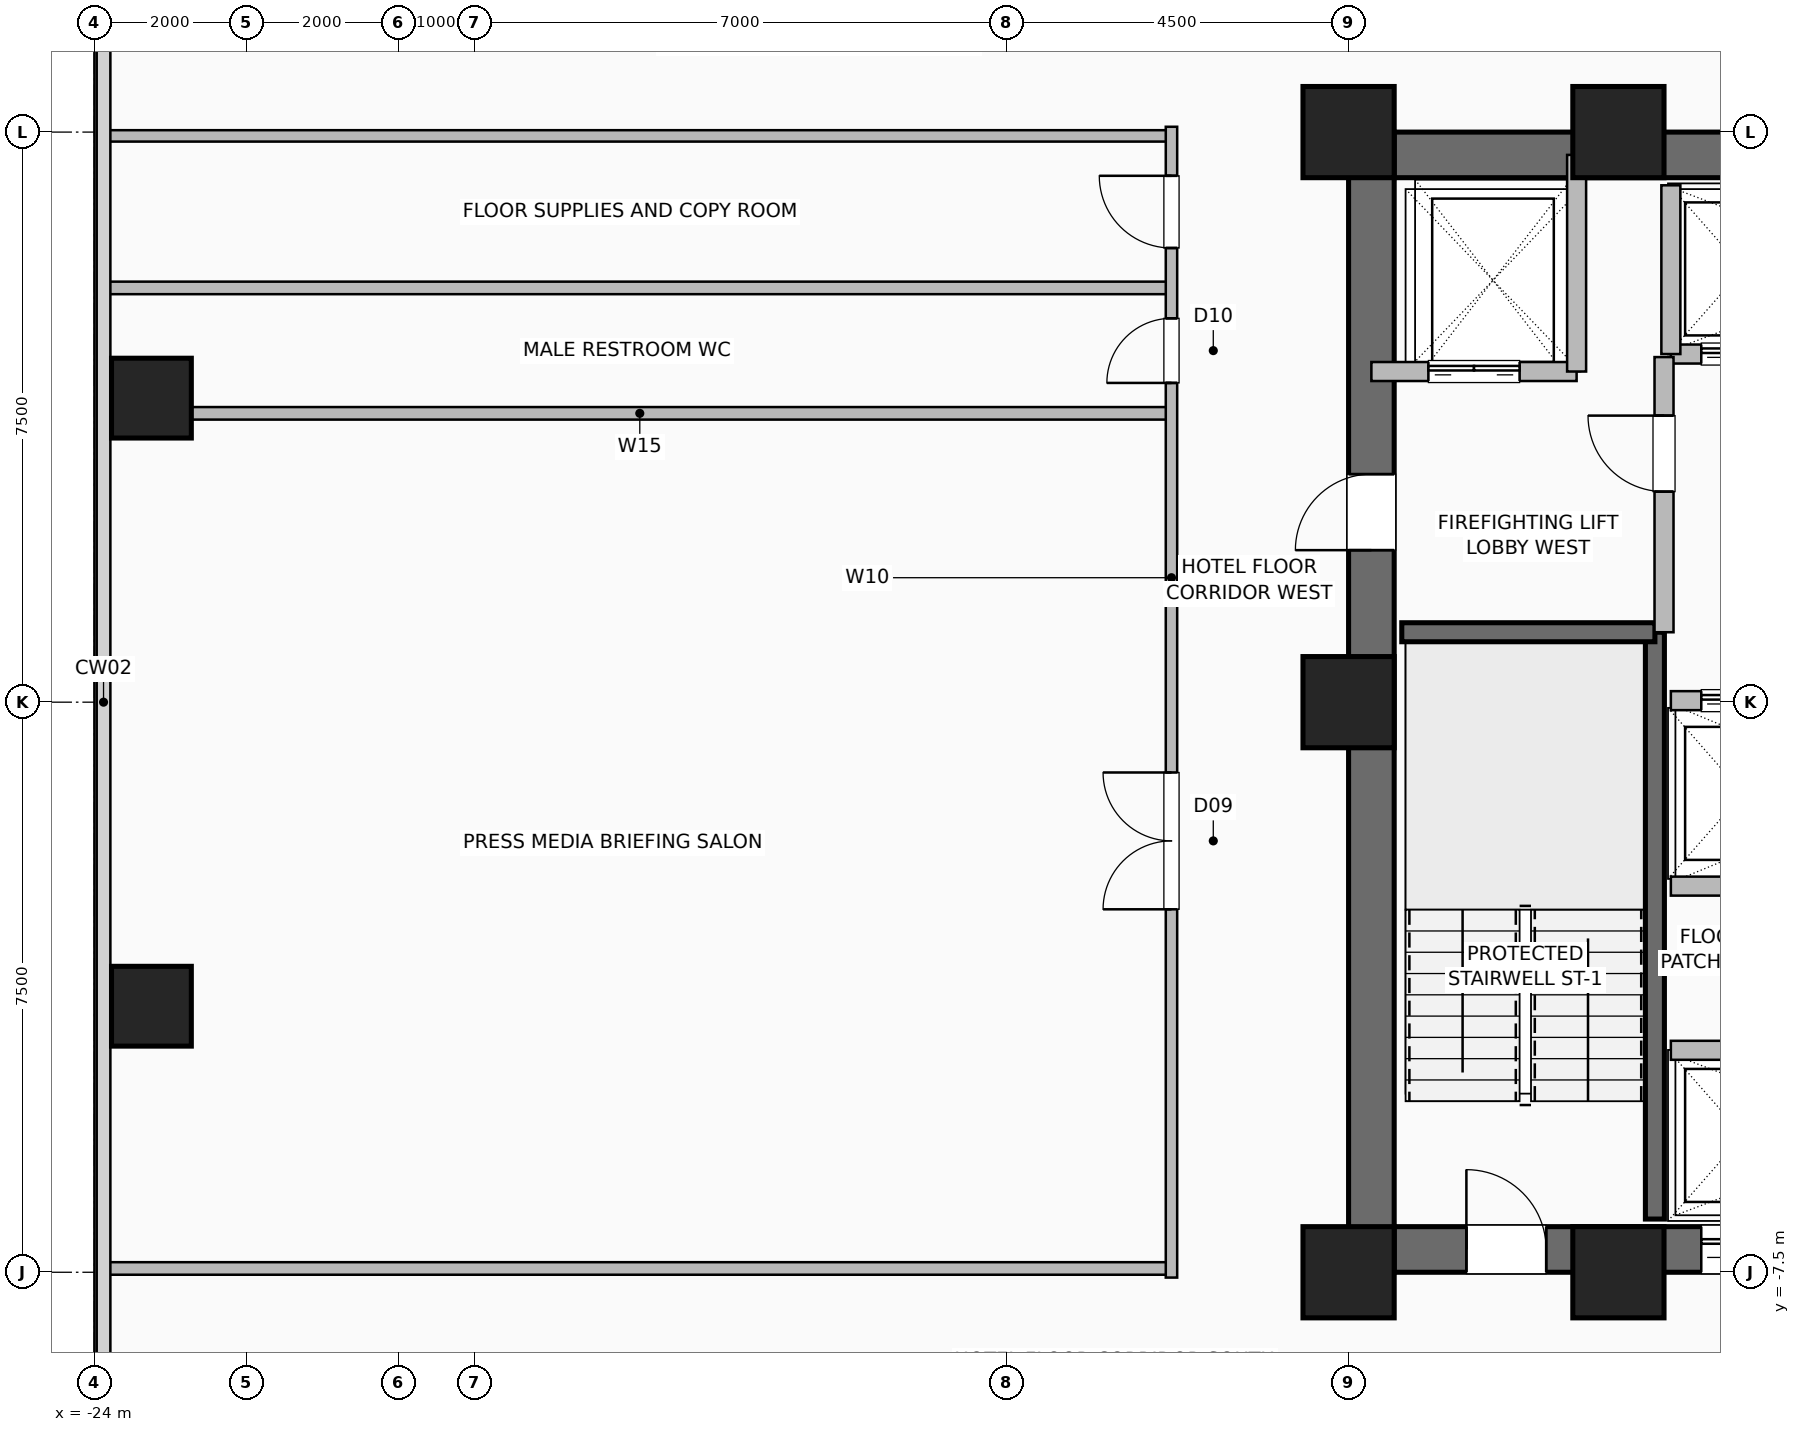
"""IFC4 building model, lengths in metres.
Left out: names, types, materials, properties, quantities, classifications, styles, units other than length and angle.
Written with IfcOpenShell. Run it as: python <this file> out.ifc"""

import sys

from ifc_helpers import new_model, si_unit, direction, frame, frame_2d, origin, origin_2d, place, context, subcontext, project, spatial, rectangle, hollow_rectangle, extrude, element, fill, save


model = new_model("IFC4")
c1 = context("Model", 3, precision=1e-05, world=origin(), true_north=direction((0.0, 1.0)))
c2 = subcontext(c1, "Body", "Model", "MODEL_VIEW")
j1 = project(units=[si_unit("LENGTHUNIT", "METRE"), si_unit("PLANEANGLEUNIT", "RADIAN")], contexts=[c1])
p1 = place(None, origin())
s1 = spatial("IfcSite", under=j1, at=p1, CompositionType="ELEMENT")
p2 = place(p1, origin())
s2 = spatial("IfcBuilding", under=s1, at=p2, CompositionType="ELEMENT")
p3 = place(p2, frame((0.0, 0.0, 44.5)))
s3 = spatial("IfcBuildingStorey", under=s2, at=p3, CompositionType="ELEMENT", Elevation=44.5)
for number, where, z_axis, x_axis in (
    (1, (-7.5, -7.5, 0.0), (0.0, 0.0, 1.0), (1.0, 0.0, 0.0)),
    (2, (-3.95, -7.5, 0.0), (0.0, 0.0, 1.0), (1.0, 0.0, 0.0)),
    (3, (-3.95, 7.5, 0.0), (0.0, 0.0, 1.0), (1.0, 0.0, 0.0)),
    (4, (-7.5, 7.5, 0.0), (0.0, 0.0, 1.0), (1.0, 0.0, 0.0)),
    (5, (-7.5, 0.0, 0.0), (0.0, 0.0, 1.0), (1.0, 0.0, 0.0)),
):
    element("IfcColumn", number, at=place(p3, frame(where, z_axis=z_axis, x_axis=x_axis)), inside=s3, PredefinedType="COLUMN", context=c2, shape_type="SweptSolid", body=[
        extrude(hollow_rectangle(XDim=1.2, YDim=1.2, WallThickness=0.055, at=origin_2d()), origin(), (0.0, 0.0, 1.0), 3.5),
    ])
for number, where, z_axis, x_axis in (
    (6, (-23.25, -4.0, 0.0), (0.0, 0.0, 1.0), (1.0, 0.0, 0.0)),
    (7, (-23.25, 4.0, 0.0), (0.0, 0.0, 1.0), (1.0, 0.0, 0.0)),
):
    element("IfcColumn", number, at=place(p3, frame(where, z_axis=z_axis, x_axis=x_axis)), inside=s3, PredefinedType="COLUMN", context=c2, shape_type="SweptSolid", body=[
        extrude(hollow_rectangle(XDim=1.05, YDim=1.05, WallThickness=0.05, at=origin_2d()), origin(), (0.0, 0.0, 1.0), 3.5),
    ])
p4 = place(p3, frame((-7.5, -7.2, 0.0), z_axis=(0.0, 0.0, 1.0), x_axis=(1.0, 0.0, 0.0)))
e8 = element("IfcWall", 8, at=p4, inside=s3, PredefinedType="SHEAR", context=c2, shape_type="SweptSolid", body=[
    extrude(rectangle(XDim=15.0, YDim=0.6, at=frame_2d((7.5, 0.0))), origin(), (0.0, 0.0, 1.0), 3.25),
])
p5 = place(p4, frame((1.55, 0.0, 0.0)))
e9 = element("IfcOpeningElement", 9, at=p5, cuts=e8, PredefinedType="OPENING", context=c2, shape_type="SweptSolid", body=[
    extrude(rectangle(XDim=1.05, YDim=2.08, at=frame_2d((0.525, 1.04))), frame((0.0, 0.31, 0.0), z_axis=(0.0, -1.0, 0.0), x_axis=(1.0, 0.0, 0.0)), (0.0, 0.0, 1.0), 0.62),
])
p6 = place(p4, frame((12.4, 0.0, 0.0)))
e10 = element("IfcOpeningElement", 10, at=p6, cuts=e8, PredefinedType="OPENING", context=c2, shape_type="SweptSolid", body=[
    extrude(rectangle(XDim=1.05, YDim=2.08, at=frame_2d((0.525, 1.04))), frame((0.0, 0.31, 0.0), z_axis=(0.0, -1.0, 0.0), x_axis=(1.0, 0.0, 0.0)), (0.0, 0.0, 1.0), 0.62),
])
p7 = place(p4, frame((4.64, 0.0, 0.0)))
e11 = element("IfcOpeningElement", 11, at=p7, cuts=e8, PredefinedType="OPENING", context=c2, shape_type="SweptSolid", body=[
    extrude(rectangle(XDim=1.1, YDim=2.2, at=frame_2d((0.55, 1.1))), frame((0.0, 0.31, 0.0), z_axis=(0.0, -1.0, 0.0), x_axis=(1.0, 0.0, 0.0)), (0.0, 0.0, 1.0), 0.62),
])
p8 = place(p4, frame((6.52, 0.0, 0.0)))
e12 = element("IfcOpeningElement", 12, at=p8, cuts=e8, PredefinedType="OPENING", context=c2, shape_type="SweptSolid", body=[
    extrude(rectangle(XDim=1.1, YDim=2.2, at=frame_2d((0.55, 1.1))), frame((0.0, 0.31, 0.0), z_axis=(0.0, -1.0, 0.0), x_axis=(1.0, 0.0, 0.0)), (0.0, 0.0, 1.0), 0.62),
])
p9 = place(p4, frame((8.4, 0.0, 0.0)))
e13 = element("IfcOpeningElement", 13, at=p9, cuts=e8, PredefinedType="OPENING", context=c2, shape_type="SweptSolid", body=[
    extrude(rectangle(XDim=1.1, YDim=2.2, at=frame_2d((0.55, 1.1))), frame((0.0, 0.31, 0.0), z_axis=(0.0, -1.0, 0.0), x_axis=(1.0, 0.0, 0.0)), (0.0, 0.0, 1.0), 0.62),
])
p10 = place(p3, frame((-7.5, 7.2, 0.0), z_axis=(0.0, 0.0, 1.0), x_axis=(1.0, 0.0, 0.0)))
e14 = element("IfcWall", 14, at=p10, inside=s3, PredefinedType="SHEAR", context=c2, shape_type="SweptSolid", body=[
    extrude(rectangle(XDim=15.0, YDim=0.6, at=frame_2d((7.5, 0.0))), origin(), (0.0, 0.0, 1.0), 3.25),
])
p11 = place(p3, frame((-7.2, -7.5, 0.0), z_axis=(0.0, 0.0, 1.0), x_axis=(0.0, 1.0, 0.0)))
e15 = element("IfcWall", 15, at=p11, inside=s3, PredefinedType="SHEAR", context=c2, shape_type="SweptSolid", body=[
    extrude(rectangle(XDim=15.0, YDim=0.6, at=frame_2d((7.5, 0.0))), origin(), (0.0, 0.0, 1.0), 3.25),
])
p12 = place(p11, frame((9.5, 0.0, 0.0)))
e16 = element("IfcOpeningElement", 16, at=p12, cuts=e15, PredefinedType="OPENING", context=c2, shape_type="SweptSolid", body=[
    extrude(rectangle(XDim=1.0, YDim=2.08, at=frame_2d((0.5, 1.04))), frame((0.0, 0.31, 0.0), z_axis=(0.0, -1.0, 0.0), x_axis=(1.0, 0.0, 0.0)), (0.0, 0.0, 1.0), 0.62),
])
p13 = place(p3, frame((-3.47, -6.8, 0.0), z_axis=(0.0, 0.0, 1.0), x_axis=(0.0, 1.0, 0.0)))
e17 = element("IfcWall", 17, at=p13, inside=s3, PredefinedType="SHEAR", context=c2, shape_type="SweptSolid", body=[
    extrude(rectangle(XDim=7.72, YDim=0.25, at=frame_2d((3.86, 0.0))), origin(), (0.0, 0.0, 1.0), 3.25),
])
p14 = place(p3, frame((-6.8, 0.92, 0.0), z_axis=(0.0, 0.0, 1.0), x_axis=(1.0, 0.0, 0.0)))
e18 = element("IfcWall", 18, at=p14, inside=s3, PredefinedType="SHEAR", context=c2, shape_type="SweptSolid", body=[
    extrude(rectangle(XDim=3.33, YDim=0.25, at=frame_2d((1.665, 0.0))), origin(), (0.0, 0.0, 1.0), 3.25),
])
p15 = place(p3, frame((-3.26, -4.58, 0.0), z_axis=(0.0, 0.0, 1.0), x_axis=(1.0, 0.0, 0.0)))
e19 = element("IfcWall", 19, at=p15, inside=s3, PredefinedType="SHEAR", context=c2, shape_type="SweptSolid", body=[
    extrude(rectangle(XDim=5.64, YDim=0.25, at=frame_2d((2.82, 0.0))), origin(), (0.0, 0.0, 1.0), 3.25),
])
p16 = place(p3, frame((-3.26, 0.02, 0.0), z_axis=(0.0, 0.0, 1.0), x_axis=(1.0, 0.0, 0.0)))
e20 = element("IfcWall", 20, at=p16, inside=s3, PredefinedType="SHEAR", context=c2, shape_type="SweptSolid", body=[
    extrude(rectangle(XDim=5.64, YDim=0.25, at=frame_2d((2.82, 0.0))), origin(), (0.0, 0.0, 1.0), 3.25),
])
p17 = place(p16, frame((0.4, 0.0, 0.0)))
e21 = element("IfcOpeningElement", 21, at=p17, cuts=e20, PredefinedType="OPENING", context=c2, shape_type="SweptSolid", body=[
    extrude(rectangle(XDim=1.1, YDim=2.2, at=frame_2d((0.55, 1.1))), frame((0.0, 0.135, 0.0), z_axis=(0.0, -1.0, 0.0), x_axis=(1.0, 0.0, 0.0)), (0.0, 0.0, 1.0), 0.27),
])
p18 = place(p16, frame((2.28, 0.0, 0.0)))
e22 = element("IfcOpeningElement", 22, at=p18, cuts=e20, PredefinedType="OPENING", context=c2, shape_type="SweptSolid", body=[
    extrude(rectangle(XDim=1.1, YDim=2.2, at=frame_2d((0.55, 1.1))), frame((0.0, 0.135, 0.0), z_axis=(0.0, -1.0, 0.0), x_axis=(1.0, 0.0, 0.0)), (0.0, 0.0, 1.0), 0.27),
])
p19 = place(p16, frame((4.16, 0.0, 0.0)))
e23 = element("IfcOpeningElement", 23, at=p19, cuts=e20, PredefinedType="OPENING", context=c2, shape_type="SweptSolid", body=[
    extrude(rectangle(XDim=1.1, YDim=2.2, at=frame_2d((0.55, 1.1))), frame((0.0, 0.135, 0.0), z_axis=(0.0, -1.0, 0.0), x_axis=(1.0, 0.0, 0.0)), (0.0, 0.0, 1.0), 0.27),
])
p20 = place(p3, frame((-3.26, -2.42, 0.0), z_axis=(0.0, 0.0, 1.0), x_axis=(1.0, 0.0, 0.0)))
e24 = element("IfcWall", 24, at=p20, inside=s3, PredefinedType="SHEAR", context=c2, shape_type="SweptSolid", body=[
    extrude(rectangle(XDim=5.64, YDim=0.25, at=frame_2d((2.82, 0.0))), origin(), (0.0, 0.0, 1.0), 3.25),
])
p21 = place(p3, frame((-3.26, 4.58, 0.0), z_axis=(0.0, 0.0, 1.0), x_axis=(1.0, 0.0, 0.0)))
e25 = element("IfcWall", 25, at=p21, inside=s3, PredefinedType="SHEAR", context=c2, shape_type="SweptSolid", body=[
    extrude(rectangle(XDim=5.64, YDim=0.25, at=frame_2d((2.82, 0.0))), origin(), (0.0, 0.0, 1.0), 3.25),
])
p22 = place(p21, frame((0.4, 0.0, 0.0)))
e26 = element("IfcOpeningElement", 26, at=p22, cuts=e25, PredefinedType="OPENING", context=c2, shape_type="SweptSolid", body=[
    extrude(rectangle(XDim=1.1, YDim=2.2, at=frame_2d((0.55, 1.1))), frame((0.0, 0.135, 0.0), z_axis=(0.0, -1.0, 0.0), x_axis=(1.0, 0.0, 0.0)), (0.0, 0.0, 1.0), 0.27),
])
p23 = place(p21, frame((2.28, 0.0, 0.0)))
e27 = element("IfcOpeningElement", 27, at=p23, cuts=e25, PredefinedType="OPENING", context=c2, shape_type="SweptSolid", body=[
    extrude(rectangle(XDim=1.1, YDim=2.2, at=frame_2d((0.55, 1.1))), frame((0.0, 0.135, 0.0), z_axis=(0.0, -1.0, 0.0), x_axis=(1.0, 0.0, 0.0)), (0.0, 0.0, 1.0), 0.27),
])
p24 = place(p21, frame((4.16, 0.0, 0.0)))
e28 = element("IfcOpeningElement", 28, at=p24, cuts=e25, PredefinedType="OPENING", context=c2, shape_type="SweptSolid", body=[
    extrude(rectangle(XDim=1.1, YDim=2.2, at=frame_2d((0.55, 1.1))), frame((0.0, 0.135, 0.0), z_axis=(0.0, -1.0, 0.0), x_axis=(1.0, 0.0, 0.0)), (0.0, 0.0, 1.0), 0.27),
])
p25 = place(p3, frame((-3.26, 4.58, 0.0), z_axis=(0.0, 0.0, 1.0), x_axis=(0.0, 1.0, 0.0)))
e29 = element("IfcWall", 29, at=p25, inside=s3, PredefinedType="SHEAR", context=c2, shape_type="SweptSolid", body=[
    extrude(rectangle(XDim=2.22, YDim=0.25, at=frame_2d((1.11, 0.0))), origin(), (0.0, 0.0, 1.0), 3.25),
])
p26 = place(p3, frame((-7.2, 4.35, 0.0), z_axis=(0.0, 0.0, 1.0), x_axis=(1.0, 0.0, 0.0)))
e30 = element("IfcWall", 30, at=p26, inside=s3, PredefinedType="SHEAR", context=c2, shape_type="SweptSolid", body=[
    extrude(rectangle(XDim=2.7, YDim=0.25, at=frame_2d((1.35, 0.0))), origin(), (0.0, 0.0, 1.0), 3.25),
])
p27 = place(p26, frame((0.75, 0.0, 0.0)))
e31 = element("IfcOpeningElement", 31, at=p27, cuts=e30, PredefinedType="OPENING", context=c2, shape_type="SweptSolid", body=[
    extrude(rectangle(XDim=1.2, YDim=2.2, at=frame_2d((0.6, 1.1))), frame((0.0, 0.135, 0.0), z_axis=(0.0, -1.0, 0.0), x_axis=(1.0, 0.0, 0.0)), (0.0, 0.0, 1.0), 0.27),
])
p28 = place(p3, frame((-4.5, 4.35, 0.0), z_axis=(0.0, 0.0, 1.0), x_axis=(0.0, 1.0, 0.0)))
e32 = element("IfcWall", 32, at=p28, inside=s3, PredefinedType="SHEAR", context=c2, shape_type="SweptSolid", body=[
    extrude(rectangle(XDim=2.85, YDim=0.25, at=frame_2d((1.425, 0.0))), origin(), (0.0, 0.0, 1.0), 3.25),
])
p29 = place(p3, frame((-3.35, 0.92, 0.0), z_axis=(0.0, 0.0, 1.0), x_axis=(0.0, 1.0, 0.0)))
e33 = element("IfcWall", 33, at=p29, inside=s3, PredefinedType="SHEAR", context=c2, shape_type="SweptSolid", body=[
    extrude(rectangle(XDim=3.62, YDim=0.25, at=frame_2d((1.81, 0.0))), origin(), (0.0, 0.0, 1.0), 3.25),
])
p30 = place(p29, frame((1.85, 0.0, 0.0)))
e34 = element("IfcOpeningElement", 34, at=p30, cuts=e33, PredefinedType="OPENING", context=c2, shape_type="SweptSolid", body=[
    extrude(rectangle(XDim=1.0, YDim=2.08, at=frame_2d((0.5, 1.04))), frame((0.0, 0.135, 0.0), z_axis=(0.0, -1.0, 0.0), x_axis=(1.0, 0.0, 0.0)), (0.0, 0.0, 1.0), 0.27),
])
for number, where, z_axis, x_axis in (
    (35, (-23.82, 5.45, 0.0), (0.0, 0.0, 1.0), (1.0, 0.0, 0.0)),
    (36, (-23.82, -7.45, 0.0), (0.0, 0.0, 1.0), (1.0, 0.0, 0.0)),
    (37, (-23.82, 3.8, 0.0), (0.0, 0.0, 1.0), (1.0, 0.0, 0.0)),
):
    element("IfcWall", number, at=place(p3, frame(where, z_axis=z_axis, x_axis=x_axis)), inside=s3, PredefinedType="PLUMBINGWALL", context=c2, shape_type="SweptSolid", body=[
        extrude(rectangle(XDim=13.99, YDim=0.165, at=frame_2d((6.995, 0.0))), origin(), (0.0, 0.0, 1.0), 3.25),
    ])
p31 = place(p3, frame((-23.82, 7.45, 0.0), z_axis=(0.0, 0.0, 1.0), x_axis=(1.0, 0.0, 0.0)))
e38 = element("IfcWall", 38, at=p31, inside=s3, PredefinedType="PARTITIONING", context=c2, shape_type="SweptSolid", body=[
    extrude(rectangle(XDim=13.99, YDim=0.15, at=frame_2d((6.995, 0.0))), origin(), (0.0, 0.0, 1.0), 3.25),
])
p32 = place(p3, frame((-9.83, -7.57, 0.0), z_axis=(0.0, 0.0, 1.0), x_axis=(0.0, 1.0, 0.0)))
e39 = element("IfcWall", 39, at=p32, inside=s3, PredefinedType="PARTITIONING", context=c2, shape_type="SweptSolid", body=[
    extrude(rectangle(XDim=15.14, YDim=0.15, at=frame_2d((7.57, 0.0))), origin(), (0.0, 0.0, 1.0), 3.25),
])
p33 = place(p32, frame((4.845, 0.0, 0.0)))
e40 = element("IfcOpeningElement", 40, at=p33, cuts=e39, PredefinedType="OPENING", context=c2, shape_type="SweptSolid", body=[
    extrude(rectangle(XDim=1.8, YDim=2.08, at=frame_2d((0.9, 1.04))), frame((0.0, 0.085, 0.0), z_axis=(0.0, -1.0, 0.0), x_axis=(1.0, 0.0, 0.0)), (0.0, 0.0, 1.0), 0.17),
])
p34 = place(p32, frame((11.77, 0.0, 0.0)))
e41 = element("IfcOpeningElement", 41, at=p34, cuts=e39, PredefinedType="OPENING", context=c2, shape_type="SweptSolid", body=[
    extrude(rectangle(XDim=0.85, YDim=2.05, at=frame_2d((0.425, 1.025))), frame((0.0, 0.085, 0.0), z_axis=(0.0, -1.0, 0.0), x_axis=(1.0, 0.0, 0.0)), (0.0, 0.0, 1.0), 0.17),
])
p35 = place(p32, frame((13.545, 0.0, 0.0)))
e42 = element("IfcOpeningElement", 42, at=p35, cuts=e39, PredefinedType="OPENING", context=c2, shape_type="SweptSolid", body=[
    extrude(rectangle(XDim=0.95, YDim=2.06, at=frame_2d((0.475, 1.03))), frame((0.0, 0.085, 0.0), z_axis=(0.0, -1.0, 0.0), x_axis=(1.0, 0.0, 0.0)), (0.0, 0.0, 1.0), 0.17),
])
p36 = place(p5, origin())
e43 = element("IfcDoor", 43, at=p36, inside=s3, OperationType="SINGLE_SWING_LEFT", PredefinedType="DOOR", context=c2, shape_type="SweptSolid", body=[
    extrude(rectangle(XDim=1.05, YDim=2.08, at=frame_2d((0.525, 1.04))), frame((0.0, 0.025, 0.0), z_axis=(0.0, -1.0, 0.0), x_axis=(1.0, 0.0, 0.0)), (0.0, 0.0, 1.0), 0.05),
])
fill(e9, e43)
p37 = place(p12, origin())
e44 = element("IfcDoor", 44, at=p37, inside=s3, OperationType="SINGLE_SWING_LEFT", PredefinedType="DOOR", context=c2, shape_type="SweptSolid", body=[
    extrude(rectangle(XDim=1.0, YDim=2.08, at=frame_2d((0.5, 1.04))), frame((0.0, 0.025, 0.0), z_axis=(0.0, -1.0, 0.0), x_axis=(1.0, 0.0, 0.0)), (0.0, 0.0, 1.0), 0.05),
])
fill(e16, e44)
p38 = place(p7, origin())
e45 = element("IfcDoor", 45, at=p38, inside=s3, OperationType="DOUBLE_DOOR_SLIDING", PredefinedType="DOOR", context=c2, shape_type="SweptSolid", body=[
    extrude(rectangle(XDim=1.1, YDim=2.2, at=frame_2d((0.55, 1.1))), frame((0.0, 0.025, 0.0), z_axis=(0.0, -1.0, 0.0), x_axis=(1.0, 0.0, 0.0)), (0.0, 0.0, 1.0), 0.05),
])
fill(e11, e45)
p39 = place(p17, origin())
e46 = element("IfcDoor", 46, at=p39, inside=s3, OperationType="DOUBLE_DOOR_SLIDING", PredefinedType="DOOR", context=c2, shape_type="SweptSolid", body=[
    extrude(rectangle(XDim=1.1, YDim=2.2, at=frame_2d((0.55, 1.1))), frame((0.0, 0.025, 0.0), z_axis=(0.0, -1.0, 0.0), x_axis=(1.0, 0.0, 0.0)), (0.0, 0.0, 1.0), 0.05),
])
fill(e21, e46)
p40 = place(p22, origin())
e47 = element("IfcDoor", 47, at=p40, inside=s3, OperationType="DOUBLE_DOOR_SLIDING", PredefinedType="DOOR", context=c2, shape_type="SweptSolid", body=[
    extrude(rectangle(XDim=1.1, YDim=2.2, at=frame_2d((0.55, 1.1))), frame((0.0, 0.025, 0.0), z_axis=(0.0, -1.0, 0.0), x_axis=(1.0, 0.0, 0.0)), (0.0, 0.0, 1.0), 0.05),
])
fill(e26, e47)
p41 = place(p27, origin())
e48 = element("IfcDoor", 48, at=p41, inside=s3, OperationType="DOUBLE_DOOR_SLIDING", PredefinedType="DOOR", context=c2, shape_type="SweptSolid", body=[
    extrude(rectangle(XDim=1.2, YDim=2.2, at=frame_2d((0.6, 1.1))), frame((0.0, 0.025, 0.0), z_axis=(0.0, -1.0, 0.0), x_axis=(1.0, 0.0, 0.0)), (0.0, 0.0, 1.0), 0.05),
])
fill(e31, e48)
p42 = place(p30, origin())
e49 = element("IfcDoor", 49, at=p42, inside=s3, OperationType="SINGLE_SWING_RIGHT", PredefinedType="DOOR", context=c2, shape_type="SweptSolid", body=[
    extrude(rectangle(XDim=1.0, YDim=2.08, at=frame_2d((0.5, 1.04))), frame((0.0, 0.025, 0.0), z_axis=(0.0, -1.0, 0.0), x_axis=(1.0, 0.0, 0.0)), (0.0, 0.0, 1.0), 0.05),
])
fill(e34, e49)
p43 = place(p33, origin())
e50 = element("IfcDoor", 50, at=p43, inside=s3, OperationType="DOUBLE_DOOR_SINGLE_SWING", PredefinedType="DOOR", context=c2, shape_type="SweptSolid", body=[
    extrude(rectangle(XDim=1.8, YDim=2.08, at=frame_2d((0.9, 1.04))), frame((0.0, 0.025, 0.0), z_axis=(0.0, -1.0, 0.0), x_axis=(1.0, 0.0, 0.0)), (0.0, 0.0, 1.0), 0.05),
])
fill(e40, e50)
p44 = place(p34, origin())
e51 = element("IfcDoor", 51, at=p44, inside=s3, OperationType="SINGLE_SWING_LEFT", PredefinedType="DOOR", context=c2, shape_type="SweptSolid", body=[
    extrude(rectangle(XDim=0.85, YDim=2.05, at=frame_2d((0.425, 1.025))), frame((0.0, 0.025, 0.0), z_axis=(0.0, -1.0, 0.0), x_axis=(1.0, 0.0, 0.0)), (0.0, 0.0, 1.0), 0.05),
])
fill(e41, e51)
p45 = place(p35, origin())
e52 = element("IfcDoor", 52, at=p45, inside=s3, OperationType="SINGLE_SWING_RIGHT", PredefinedType="DOOR", context=c2, shape_type="SweptSolid", body=[
    extrude(rectangle(XDim=0.95, YDim=2.06, at=frame_2d((0.475, 1.03))), frame((0.0, 0.025, 0.0), z_axis=(0.0, -1.0, 0.0), x_axis=(1.0, 0.0, 0.0)), (0.0, 0.0, 1.0), 0.05),
])
fill(e42, e52)
save(model, sys.argv[1])
